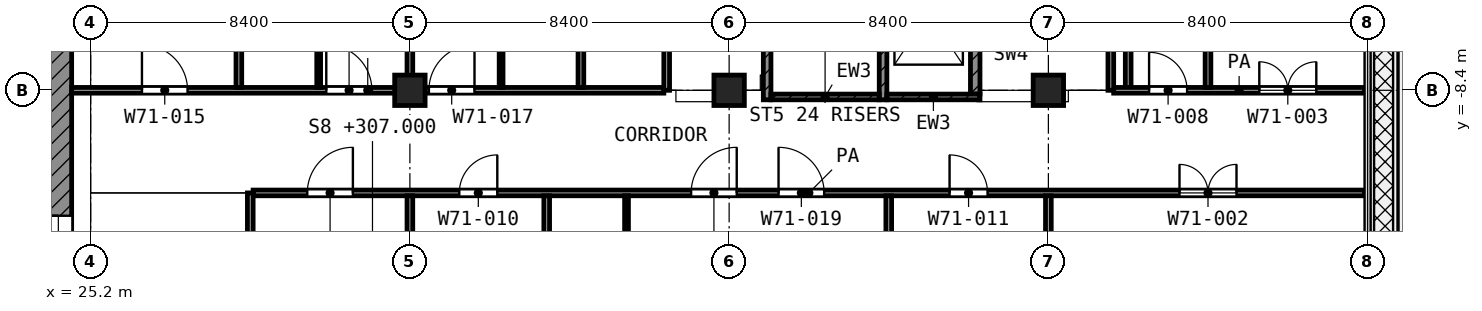
"""IFC4 building model, lengths in metres.
Left out: names, types, materials, properties, quantities, classifications, styles, units other than length and angle.
Written with IfcOpenShell. Run it as: python <this file> out.ifc"""

import sys

from ifc_helpers import new_model, si_unit, direction, frame, frame_2d, origin, origin_2d, place, context, subcontext, project, spatial, rectangle, extrude, element, fill, save


model = new_model("IFC4")
c1 = context("Model", 3, precision=1e-05, world=origin(), true_north=direction((0.0, 1.0)))
c2 = subcontext(c1, "Body", "Model", "MODEL_VIEW")
j1 = project(units=[si_unit("LENGTHUNIT", "METRE"), si_unit("PLANEANGLEUNIT", "RADIAN")], contexts=[c1])
p1 = place(None, origin())
s1 = spatial("IfcSite", under=j1, at=p1, CompositionType="ELEMENT")
p2 = place(p1, origin())
s2 = spatial("IfcBuilding", under=s1, at=p2, CompositionType="ELEMENT")
p3 = place(p2, frame((0.0, 0.0, 307.0)))
s3 = spatial("IfcBuildingStorey", under=s2, at=p3, CompositionType="ELEMENT", Elevation=307.0)
for number, where, z_axis, x_axis in (
    (1, (33.6, -8.4, 0.0), (0.0, 0.0, 1.0), (1.0, 0.0, 0.0)),
    (2, (42.0, -8.4, 0.0), (0.0, 0.0, 1.0), (1.0, 0.0, 0.0)),
    (3, (50.4, -8.4, 0.0), (0.0, 0.0, 1.0), (1.0, 0.0, 0.0)),
):
    element("IfcColumn", number, at=place(p3, frame(where, z_axis=z_axis, x_axis=x_axis)), inside=s3, PredefinedType="COLUMN", context=c2, shape_type="SweptSolid", body=[
        extrude(rectangle(XDim=0.8, YDim=0.8, at=origin_2d()), origin(), (0.0, 0.0, 1.0), 4.2),
    ])
p4 = place(p3, frame((24.35, -24.0, 0.0), z_axis=(0.0, 0.0, 1.0), x_axis=(0.0, 1.0, 0.0)))
e4 = element("IfcWall", 4, at=p4, inside=s3, PredefinedType="SHEAR", context=c2, shape_type="SweptSolid", body=[
    extrude(rectangle(XDim=18.6, YDim=0.7, at=frame_2d((9.3, 0.0))), origin(), (0.0, 0.0, 1.0), 3.6),
])
p5 = place(p4, frame((10.5, 0.0, 0.0)))
e5 = element("IfcOpeningElement", 5, at=p5, cuts=e4, PredefinedType="OPENING", context=c2, shape_type="SweptSolid", body=[
    extrude(rectangle(XDim=1.8, YDim=2.1, at=frame_2d((0.9, 1.05))), frame((0.0, 0.36, 0.0), z_axis=(0.0, -1.0, 0.0), x_axis=(1.0, 0.0, 0.0)), (0.0, 0.0, 1.0), 0.72),
])
p6 = place(p3, frame((43.0, -8.65, 0.0), z_axis=(0.0, 0.0, 1.0), x_axis=(0.0, 1.0, 0.0)))
e6 = element("IfcWall", 6, at=p6, inside=s3, PredefinedType="SHEAR", context=c2, shape_type="SweptSolid", body=[
    extrude(rectangle(XDim=8.35, YDim=0.2, at=frame_2d((4.175, 0.0))), origin(), (0.0, 0.0, 1.0), 3.6),
])
p7 = place(p6, frame((7.0, 0.0, 0.0)))
e7 = element("IfcOpeningElement", 7, at=p7, cuts=e6, PredefinedType="OPENING", context=c2, shape_type="SweptSolid", body=[
    extrude(rectangle(XDim=1.1, YDim=2.1, at=frame_2d((0.55, 1.05))), frame((0.0, 0.11, 0.0), z_axis=(0.0, -1.0, 0.0), x_axis=(1.0, 0.0, 0.0)), (0.0, 0.0, 1.0), 0.22),
])
p8 = place(p3, frame((46.05, -8.65, 0.0), z_axis=(0.0, 0.0, 1.0), x_axis=(0.0, 1.0, 0.0)))
e8 = element("IfcWall", 8, at=p8, inside=s3, PredefinedType="SHEAR", context=c2, shape_type="SweptSolid", body=[
    extrude(rectangle(XDim=8.35, YDim=0.2, at=frame_2d((4.175, 0.0))), origin(), (0.0, 0.0, 1.0), 3.6),
])
p9 = place(p8, frame((7.0, 0.0, 0.0)))
e9 = element("IfcOpeningElement", 9, at=p9, cuts=e8, PredefinedType="OPENING", context=c2, shape_type="SweptSolid", body=[
    extrude(rectangle(XDim=1.1, YDim=2.1, at=frame_2d((0.55, 1.05))), frame((0.0, 0.11, 0.0), z_axis=(0.0, -1.0, 0.0), x_axis=(1.0, 0.0, 0.0)), (0.0, 0.0, 1.0), 0.22),
])
p10 = place(p3, frame((43.1, -8.575, 0.0), z_axis=(0.0, 0.0, 1.0), x_axis=(1.0, 0.0, 0.0)))
e10 = element("IfcWall", 10, at=p10, inside=s3, PredefinedType="SHEAR", context=c2, shape_type="SweptSolid", body=[
    extrude(rectangle(XDim=2.85, YDim=0.15, at=frame_2d((1.425, 0.0))), origin(), (0.0, 0.0, 1.0), 3.6),
])
p11 = place(p3, frame((46.15, -8.575, 0.0), z_axis=(0.0, 0.0, 1.0), x_axis=(1.0, 0.0, 0.0)))
e11 = element("IfcWall", 11, at=p11, inside=s3, PredefinedType="SHEAR", context=c2, shape_type="SweptSolid", body=[
    extrude(rectangle(XDim=2.45, YDim=0.15, at=frame_2d((1.225, 0.0))), origin(), (0.0, 0.0, 1.0), 3.6),
])
p12 = place(p3, frame((48.475, -8.5, 0.0), z_axis=(0.0, 0.0, 1.0), x_axis=(0.0, 1.0, 0.0)))
e12 = element("IfcWall", 12, at=p12, inside=s3, PredefinedType="SHEAR", context=c2, shape_type="SweptSolid", body=[
    extrude(rectangle(XDim=3.475, YDim=0.25, at=frame_2d((1.738, 0.0))), origin(), (0.0, 0.0, 1.0), 3.6),
])
for number, where, z_axis, x_axis in (
    (13, (31.2, -8.325, 0.0), (0.0, 0.0, 1.0), (0.0, 1.0, 0.0)),
    (14, (36.0, -8.325, 0.0), (0.0, 0.0, 1.0), (0.0, 1.0, 0.0)),
    (15, (39.3, -13.8, 0.0), (0.0, 0.0, 1.0), (0.0, 1.0, 0.0)),
):
    element("IfcWall", number, at=place(p3, frame(where, z_axis=z_axis, x_axis=x_axis)), inside=s3, PredefinedType="PARTITIONING", context=c2, shape_type="SweptSolid", body=[
        extrude(rectangle(XDim=2.625, YDim=0.1, at=frame_2d((1.312, 0.0))), origin(), (0.0, 0.0, 1.0), 3.6),
    ])
p13 = place(p3, frame((29.475, -11.1, 0.0), z_axis=(0.0, 0.0, 1.0), x_axis=(1.0, 0.0, 0.0)))
e16 = element("IfcWall", 16, at=p13, inside=s3, PredefinedType="PARTITIONING", context=c2, shape_type="SweptSolid", body=[
    extrude(rectangle(XDim=29.245, YDim=0.15, at=frame_2d((14.623, 0.0))), origin(), (0.0, 0.0, 1.0), 3.6),
])
p14 = place(p13, frame((1.425, 0.0, 0.0)))
e17 = element("IfcOpeningElement", 17, at=p14, cuts=e16, PredefinedType="OPENING", context=c2, shape_type="SweptSolid", body=[
    extrude(rectangle(XDim=1.2, YDim=2.1, at=frame_2d((0.6, 1.05))), frame((0.0, 0.085, 0.0), z_axis=(0.0, -1.0, 0.0), x_axis=(1.0, 0.0, 0.0)), (0.0, 0.0, 1.0), 0.17),
])
p15 = place(p13, frame((5.425, 0.0, 0.0)))
e18 = element("IfcOpeningElement", 18, at=p15, cuts=e16, PredefinedType="OPENING", context=c2, shape_type="SweptSolid", body=[
    extrude(rectangle(XDim=1.0, YDim=2.1, at=frame_2d((0.5, 1.05))), frame((0.0, 0.085, 0.0), z_axis=(0.0, -1.0, 0.0), x_axis=(1.0, 0.0, 0.0)), (0.0, 0.0, 1.0), 0.17),
])
p16 = place(p13, frame((13.825, 0.0, 0.0)))
e19 = element("IfcOpeningElement", 19, at=p16, cuts=e16, PredefinedType="OPENING", context=c2, shape_type="SweptSolid", body=[
    extrude(rectangle(XDim=1.2, YDim=2.1, at=frame_2d((0.6, 1.05))), frame((0.0, 0.085, 0.0), z_axis=(0.0, -1.0, 0.0), x_axis=(1.0, 0.0, 0.0)), (0.0, 0.0, 1.0), 0.17),
])
p17 = place(p13, frame((11.525, 0.0, 0.0)))
e20 = element("IfcOpeningElement", 20, at=p17, cuts=e16, PredefinedType="OPENING", context=c2, shape_type="SweptSolid", body=[
    extrude(rectangle(XDim=1.2, YDim=2.1, at=frame_2d((0.6, 1.05))), frame((0.0, 0.085, 0.0), z_axis=(0.0, -1.0, 0.0), x_axis=(1.0, 0.0, 0.0)), (0.0, 0.0, 1.0), 0.17),
])
p18 = place(p13, frame((18.325, 0.0, 0.0)))
e21 = element("IfcOpeningElement", 21, at=p18, cuts=e16, PredefinedType="OPENING", context=c2, shape_type="SweptSolid", body=[
    extrude(rectangle(XDim=1.0, YDim=2.1, at=frame_2d((0.5, 1.05))), frame((0.0, 0.085, 0.0), z_axis=(0.0, -1.0, 0.0), x_axis=(1.0, 0.0, 0.0)), (0.0, 0.0, 1.0), 0.17),
])
p19 = place(p13, frame((24.375, 0.0, 0.0)))
e22 = element("IfcOpeningElement", 22, at=p19, cuts=e16, PredefinedType="OPENING", context=c2, shape_type="SweptSolid", body=[
    extrude(rectangle(XDim=1.5, YDim=2.1, at=frame_2d((0.75, 1.05))), frame((0.0, 0.085, 0.0), z_axis=(0.0, -1.0, 0.0), x_axis=(1.0, 0.0, 0.0)), (0.0, 0.0, 1.0), 0.17),
])
p20 = place(p3, frame((24.7, -8.4, 0.0), z_axis=(0.0, 0.0, 1.0), x_axis=(1.0, 0.0, 0.0)))
e23 = element("IfcWall", 23, at=p20, inside=s3, PredefinedType="PARTITIONING", context=c2, shape_type="SweptSolid", body=[
    extrude(rectangle(XDim=15.582, YDim=0.15, at=frame_2d((7.791, 0.0))), origin(), (0.0, 0.0, 1.0), 3.6),
])
p21 = place(p20, frame((1.85, 0.0, 0.0)))
e24 = element("IfcOpeningElement", 24, at=p21, cuts=e23, PredefinedType="OPENING", context=c2, shape_type="SweptSolid", body=[
    extrude(rectangle(XDim=1.2, YDim=2.1, at=frame_2d((0.6, 1.05))), frame((0.0, 0.085, 0.0), z_axis=(0.0, -1.0, 0.0), x_axis=(1.0, 0.0, 0.0)), (0.0, 0.0, 1.0), 0.17),
])
p22 = place(p20, frame((6.7, 0.0, 0.0)))
e25 = element("IfcOpeningElement", 25, at=p22, cuts=e23, PredefinedType="OPENING", context=c2, shape_type="SweptSolid", body=[
    extrude(rectangle(XDim=1.2, YDim=2.1, at=frame_2d((0.6, 1.05))), frame((0.0, 0.085, 0.0), z_axis=(0.0, -1.0, 0.0), x_axis=(1.0, 0.0, 0.0)), (0.0, 0.0, 1.0), 0.17),
])
p23 = place(p20, frame((9.4, 0.0, 0.0)))
e26 = element("IfcOpeningElement", 26, at=p23, cuts=e23, PredefinedType="OPENING", context=c2, shape_type="SweptSolid", body=[
    extrude(rectangle(XDim=1.2, YDim=2.1, at=frame_2d((0.6, 1.05))), frame((0.0, 0.085, 0.0), z_axis=(0.0, -1.0, 0.0), x_axis=(1.0, 0.0, 0.0)), (0.0, 0.0, 1.0), 0.17),
])
p24 = place(p3, frame((52.118, -8.4, 0.0), z_axis=(0.0, 0.0, 1.0), x_axis=(1.0, 0.0, 0.0)))
e27 = element("IfcWall", 27, at=p24, inside=s3, PredefinedType="PARTITIONING", context=c2, shape_type="SweptSolid", body=[
    extrude(rectangle(XDim=6.602, YDim=0.15, at=frame_2d((3.301, 0.0))), origin(), (0.0, 0.0, 1.0), 3.6),
])
p25 = place(p24, frame((0.932, 0.0, 0.0)))
e28 = element("IfcOpeningElement", 28, at=p25, cuts=e27, PredefinedType="OPENING", context=c2, shape_type="SweptSolid", body=[
    extrude(rectangle(XDim=1.0, YDim=2.1, at=frame_2d((0.5, 1.05))), frame((0.0, 0.085, 0.0), z_axis=(0.0, -1.0, 0.0), x_axis=(1.0, 0.0, 0.0)), (0.0, 0.0, 1.0), 0.17),
])
p26 = place(p24, frame((3.832, 0.0, 0.0)))
e29 = element("IfcOpeningElement", 29, at=p26, cuts=e27, PredefinedType="OPENING", context=c2, shape_type="SweptSolid", body=[
    extrude(rectangle(XDim=1.5, YDim=2.1, at=frame_2d((0.75, 1.05))), frame((0.0, 0.085, 0.0), z_axis=(0.0, -1.0, 0.0), x_axis=(1.0, 0.0, 0.0)), (0.0, 0.0, 1.0), 0.17),
])
p27 = place(p3, frame((29.1, -8.325, 0.0), z_axis=(0.0, 0.0, 1.0), x_axis=(0.0, 1.0, 0.0)))
e30 = element("IfcWall", 30, at=p27, inside=s3, PredefinedType="PARTITIONING", context=c2, shape_type="SweptSolid", body=[
    extrude(rectangle(XDim=8.245, YDim=0.15, at=frame_2d((4.123, 0.0))), origin(), (0.0, 0.0, 1.0), 3.6),
])
p28 = place(p3, frame((29.4, -31.198, 0.0), z_axis=(0.0, 0.0, 1.0), x_axis=(0.0, 1.0, 0.0)))
e31 = element("IfcWall", 31, at=p28, inside=s3, PredefinedType="PARTITIONING", context=c2, shape_type="SweptSolid", body=[
    extrude(rectangle(XDim=20.098, YDim=0.15, at=frame_2d((10.049, 0.0))), origin(), (0.0, 0.0, 1.0), 3.6),
])
p29 = place(p3, frame((33.6, -28.687, 0.0), z_axis=(0.0, 0.0, 1.0), x_axis=(0.0, 1.0, 0.0)))
e32 = element("IfcWall", 32, at=p29, inside=s3, PredefinedType="PARTITIONING", context=c2, shape_type="SweptSolid", body=[
    extrude(rectangle(XDim=17.512, YDim=0.15, at=frame_2d((8.756, 0.0))), origin(), (0.0, 0.0, 1.0), 3.6),
])
p30 = place(p3, frame((33.6, -8.325, 0.0), z_axis=(0.0, 0.0, 1.0), x_axis=(0.0, 1.0, 0.0)))
e33 = element("IfcWall", 33, at=p30, inside=s3, PredefinedType="PARTITIONING", context=c2, shape_type="SweptSolid", body=[
    extrude(rectangle(XDim=8.245, YDim=0.15, at=frame_2d((4.123, 0.0))), origin(), (0.0, 0.0, 1.0), 3.6),
])
p31 = place(p3, frame((37.2, -25.12, 0.0), z_axis=(0.0, 0.0, 1.0), x_axis=(0.0, 1.0, 0.0)))
e34 = element("IfcWall", 34, at=p31, inside=s3, PredefinedType="PARTITIONING", context=c2, shape_type="SweptSolid", body=[
    extrude(rectangle(XDim=13.945, YDim=0.15, at=frame_2d((6.973, 0.0))), origin(), (0.0, 0.0, 1.0), 3.6),
])
p32 = place(p3, frame((38.1, -8.325, 0.0), z_axis=(0.0, 0.0, 1.0), x_axis=(0.0, 1.0, 0.0)))
e35 = element("IfcWall", 35, at=p32, inside=s3, PredefinedType="PARTITIONING", context=c2, shape_type="SweptSolid", body=[
    extrude(rectangle(XDim=8.245, YDim=0.15, at=frame_2d((4.123, 0.0))), origin(), (0.0, 0.0, 1.0), 3.6),
])
p33 = place(p3, frame((40.357, -8.4, 0.0), z_axis=(0.0, 0.0, 1.0), x_axis=(0.0, 1.0, 0.0)))
e36 = element("IfcWall", 36, at=p33, inside=s3, PredefinedType="PARTITIONING", context=c2, shape_type="SweptSolid", body=[
    extrude(rectangle(XDim=8.32, YDim=0.15, at=frame_2d((4.16, 0.0))), origin(), (0.0, 0.0, 1.0), 3.6),
])
p34 = place(p33, frame((3.7, 0.0, 0.0)))
e37 = element("IfcOpeningElement", 37, at=p34, cuts=e36, PredefinedType="OPENING", context=c2, shape_type="SweptSolid", body=[
    extrude(rectangle(XDim=1.0, YDim=2.1, at=frame_2d((0.5, 1.05))), frame((0.0, 0.085, 0.0), z_axis=(0.0, -1.0, 0.0), x_axis=(1.0, 0.0, 0.0)), (0.0, 0.0, 1.0), 0.17),
])
for number, where, z_axis, x_axis in (
    (38, (46.2, -25.12, 0.0), (0.0, 0.0, 1.0), (0.0, 1.0, 0.0)),
    (39, (50.4, -25.12, 0.0), (0.0, 0.0, 1.0), (0.0, 1.0, 0.0)),
):
    element("IfcWall", number, at=place(p3, frame(where, z_axis=z_axis, x_axis=x_axis)), inside=s3, PredefinedType="PARTITIONING", context=c2, shape_type="SweptSolid", body=[
        extrude(rectangle(XDim=13.945, YDim=0.15, at=frame_2d((6.973, 0.0))), origin(), (0.0, 0.0, 1.0), 3.6),
    ])
p35 = place(p3, frame((52.043, -8.4, 0.0), z_axis=(0.0, 0.0, 1.0), x_axis=(0.0, 1.0, 0.0)))
e40 = element("IfcWall", 40, at=p35, inside=s3, PredefinedType="PARTITIONING", context=c2, shape_type="SweptSolid", body=[
    extrude(rectangle(XDim=6.548, YDim=0.15, at=frame_2d((3.274, 0.0))), origin(), (0.0, 0.0, 1.0), 3.6),
])
p36 = place(p3, frame((52.5, -8.325, 0.0), z_axis=(0.0, 0.0, 1.0), x_axis=(0.0, 1.0, 0.0)))
e41 = element("IfcWall", 41, at=p36, inside=s3, PredefinedType="PARTITIONING", context=c2, shape_type="SweptSolid", body=[
    extrude(rectangle(XDim=7.923, YDim=0.15, at=frame_2d((3.961, 0.0))), origin(), (0.0, 0.0, 1.0), 3.6),
])
p37 = place(p3, frame((54.6, -8.325, 0.0), z_axis=(0.0, 0.0, 1.0), x_axis=(0.0, 1.0, 0.0)))
e42 = element("IfcWall", 42, at=p37, inside=s3, PredefinedType="PARTITIONING", context=c2, shape_type="SweptSolid", body=[
    extrude(rectangle(XDim=6.412, YDim=0.15, at=frame_2d((3.206, 0.0))), origin(), (0.0, 0.0, 1.0), 3.6),
])
p38 = place(p5, origin())
e43 = element("IfcDoor", 43, at=p38, inside=s3, OperationType="DOUBLE_DOOR_SINGLE_SWING", PredefinedType="DOOR", context=c2, shape_type="SweptSolid", body=[
    extrude(rectangle(XDim=1.8, YDim=2.1, at=frame_2d((0.9, 1.05))), frame((0.0, 0.025, 0.0), z_axis=(0.0, -1.0, 0.0), x_axis=(1.0, 0.0, 0.0)), (0.0, 0.0, 1.0), 0.05),
])
fill(e5, e43)
p39 = place(p21, origin())
e44 = element("IfcDoor", 44, at=p39, inside=s3, OperationType="SINGLE_SWING_LEFT", PredefinedType="DOOR", context=c2, shape_type="SweptSolid", body=[
    extrude(rectangle(XDim=1.2, YDim=2.1, at=frame_2d((0.6, 1.05))), frame((0.0, 0.025, 0.0), z_axis=(0.0, -1.0, 0.0), x_axis=(1.0, 0.0, 0.0)), (0.0, 0.0, 1.0), 0.05),
])
fill(e24, e44)
p40 = place(p22, origin())
e45 = element("IfcDoor", 45, at=p40, inside=s3, OperationType="SINGLE_SWING_LEFT", PredefinedType="DOOR", context=c2, shape_type="SweptSolid", body=[
    extrude(rectangle(XDim=1.2, YDim=2.1, at=frame_2d((0.6, 1.05))), frame((0.0, 0.025, 0.0), z_axis=(0.0, -1.0, 0.0), x_axis=(1.0, 0.0, 0.0)), (0.0, 0.0, 1.0), 0.05),
])
fill(e25, e45)
p41 = place(p23, origin())
e46 = element("IfcDoor", 46, at=p41, inside=s3, OperationType="SINGLE_SWING_RIGHT", PredefinedType="DOOR", context=c2, shape_type="SweptSolid", body=[
    extrude(rectangle(XDim=1.2, YDim=2.1, at=frame_2d((0.6, 1.05))), frame((0.0, 0.025, 0.0), z_axis=(0.0, -1.0, 0.0), x_axis=(1.0, 0.0, 0.0)), (0.0, 0.0, 1.0), 0.05),
])
fill(e26, e46)
p42 = place(p14, origin())
e47 = element("IfcDoor", 47, at=p42, inside=s3, OperationType="SINGLE_SWING_RIGHT", PredefinedType="DOOR", context=c2, shape_type="SweptSolid", body=[
    extrude(rectangle(XDim=1.2, YDim=2.1, at=frame_2d((0.6, 1.05))), frame((0.0, 0.025, 0.0), z_axis=(0.0, -1.0, 0.0), x_axis=(1.0, 0.0, 0.0)), (0.0, 0.0, 1.0), 0.05),
])
fill(e17, e47)
p43 = place(p15, origin())
e48 = element("IfcDoor", 48, at=p43, inside=s3, OperationType="SINGLE_SWING_RIGHT", PredefinedType="DOOR", context=c2, shape_type="SweptSolid", body=[
    extrude(rectangle(XDim=1.0, YDim=2.1, at=frame_2d((0.5, 1.05))), frame((0.0, 0.025, 0.0), z_axis=(0.0, -1.0, 0.0), x_axis=(1.0, 0.0, 0.0)), (0.0, 0.0, 1.0), 0.05),
])
fill(e18, e48)
p44 = place(p16, origin())
e49 = element("IfcDoor", 49, at=p44, inside=s3, OperationType="SINGLE_SWING_LEFT", PredefinedType="DOOR", context=c2, shape_type="SweptSolid", body=[
    extrude(rectangle(XDim=1.2, YDim=2.1, at=frame_2d((0.6, 1.05))), frame((0.0, 0.025, 0.0), z_axis=(0.0, -1.0, 0.0), x_axis=(1.0, 0.0, 0.0)), (0.0, 0.0, 1.0), 0.05),
])
fill(e19, e49)
p45 = place(p17, origin())
e50 = element("IfcDoor", 50, at=p45, inside=s3, OperationType="SINGLE_SWING_RIGHT", PredefinedType="DOOR", context=c2, shape_type="SweptSolid", body=[
    extrude(rectangle(XDim=1.2, YDim=2.1, at=frame_2d((0.6, 1.05))), frame((0.0, 0.025, 0.0), z_axis=(0.0, -1.0, 0.0), x_axis=(1.0, 0.0, 0.0)), (0.0, 0.0, 1.0), 0.05),
])
fill(e20, e50)
p46 = place(p18, origin())
e51 = element("IfcDoor", 51, at=p46, inside=s3, OperationType="SINGLE_SWING_LEFT", PredefinedType="DOOR", context=c2, shape_type="SweptSolid", body=[
    extrude(rectangle(XDim=1.0, YDim=2.1, at=frame_2d((0.5, 1.05))), frame((0.0, 0.025, 0.0), z_axis=(0.0, -1.0, 0.0), x_axis=(1.0, 0.0, 0.0)), (0.0, 0.0, 1.0), 0.05),
])
fill(e21, e51)
p47 = place(p19, origin())
e52 = element("IfcDoor", 52, at=p47, inside=s3, OperationType="DOUBLE_DOOR_SINGLE_SWING", PredefinedType="DOOR", context=c2, shape_type="SweptSolid", body=[
    extrude(rectangle(XDim=1.5, YDim=2.1, at=frame_2d((0.75, 1.05))), frame((0.0, 0.025, 0.0), z_axis=(0.0, -1.0, 0.0), x_axis=(1.0, 0.0, 0.0)), (0.0, 0.0, 1.0), 0.05),
])
fill(e22, e52)
p48 = place(p25, origin())
e53 = element("IfcDoor", 53, at=p48, inside=s3, OperationType="SINGLE_SWING_LEFT", PredefinedType="DOOR", context=c2, shape_type="SweptSolid", body=[
    extrude(rectangle(XDim=1.0, YDim=2.1, at=frame_2d((0.5, 1.05))), frame((0.0, 0.025, 0.0), z_axis=(0.0, -1.0, 0.0), x_axis=(1.0, 0.0, 0.0)), (0.0, 0.0, 1.0), 0.05),
])
fill(e28, e53)
p49 = place(p26, origin())
e54 = element("IfcDoor", 54, at=p49, inside=s3, OperationType="DOUBLE_DOOR_SINGLE_SWING", PredefinedType="DOOR", context=c2, shape_type="SweptSolid", body=[
    extrude(rectangle(XDim=1.5, YDim=2.1, at=frame_2d((0.75, 1.05))), frame((0.0, 0.025, 0.0), z_axis=(0.0, -1.0, 0.0), x_axis=(1.0, 0.0, 0.0)), (0.0, 0.0, 1.0), 0.05),
])
fill(e29, e54)
save(model, sys.argv[1])
